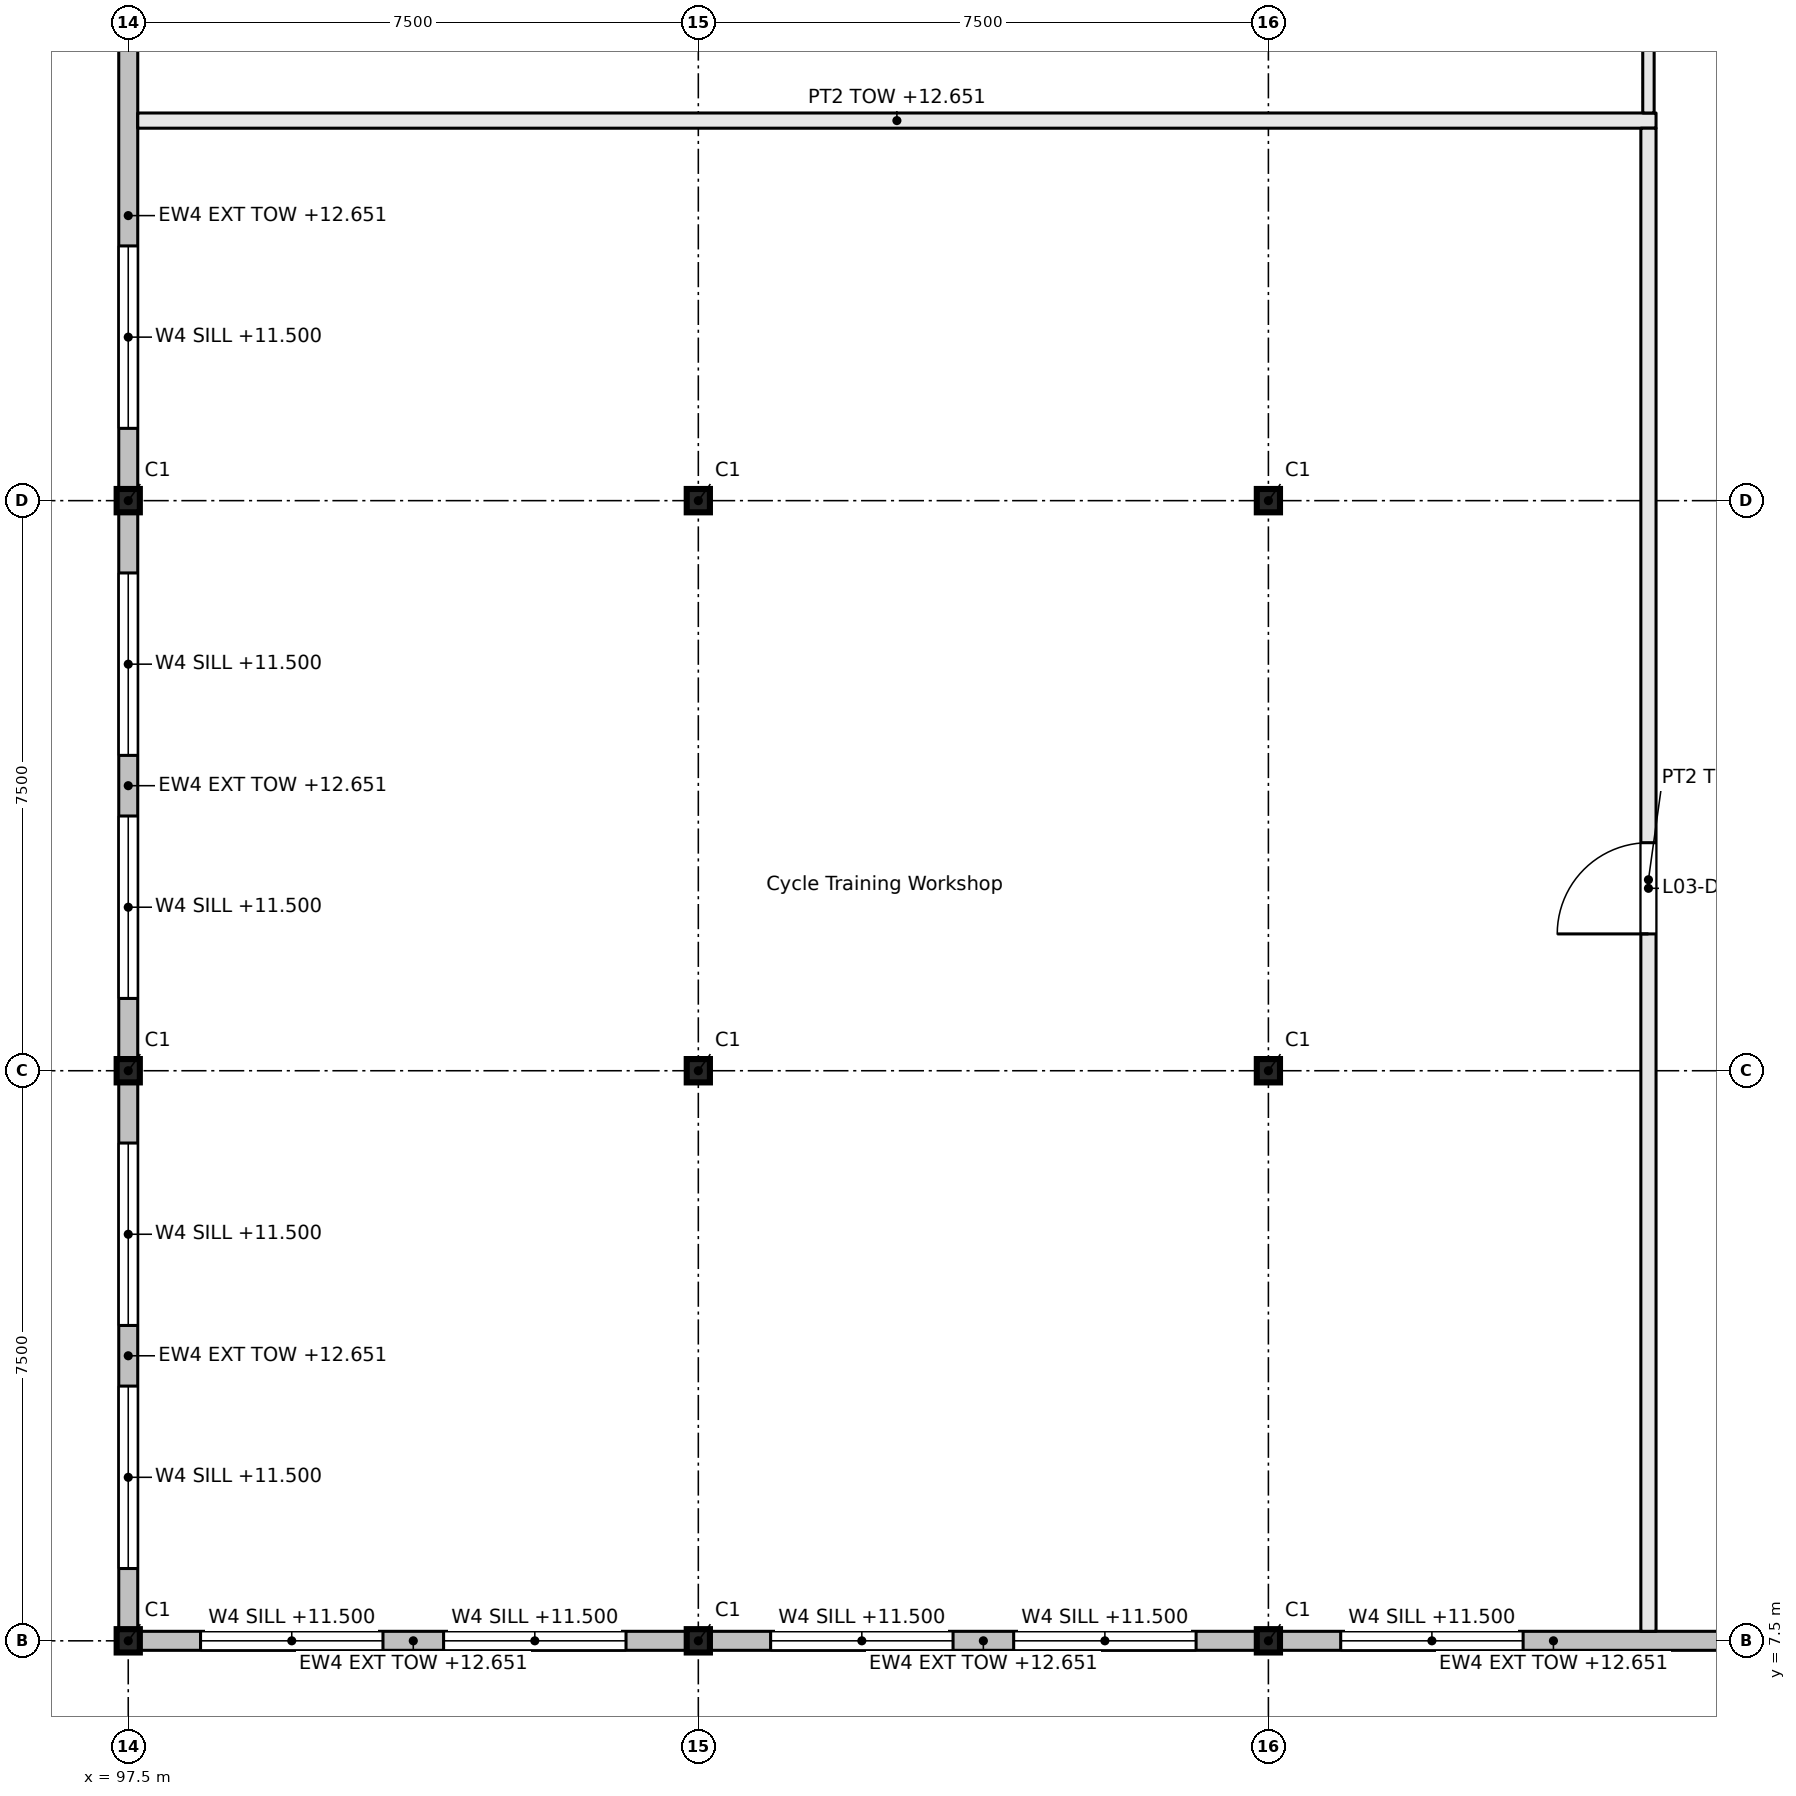
"""IFC4 building model, lengths in metres.
Left out: names, types, materials, properties, quantities, classifications, styles, units other than length and angle.
Written with IfcOpenShell. Run it as: python <this file> out.ifc"""

import sys

from ifc_helpers import new_model, si_unit, direction, frame, frame_2d, origin, origin_2d, place, context, subcontext, project, spatial, rectangle, i_section, extrude, element, fill, save


model = new_model("IFC4")
c1 = context("Model", 3, precision=1e-05, world=origin(), true_north=direction((0.0, 1.0)))
c2 = subcontext(c1, "Body", "Model", "MODEL_VIEW")
j1 = project(units=[si_unit("LENGTHUNIT", "METRE"), si_unit("PLANEANGLEUNIT", "RADIAN")], contexts=[c1])
p1 = place(None, origin())
s1 = spatial("IfcSite", under=j1, at=p1, CompositionType="ELEMENT")
p2 = place(p1, origin())
s2 = spatial("IfcBuilding", under=s1, at=p2, CompositionType="ELEMENT")
p3 = place(p2, frame((0.0, 0.0, 9.9)))
s3 = spatial("IfcBuildingStorey", under=s2, at=p3, CompositionType="ELEMENT", Elevation=9.9)
for number, where, z_axis, x_axis in (
    (1, (97.5, 7.5, 0.0), (0.0, 0.0, 1.0), (1.0, 0.0, 0.0)),
    (2, (97.5, 15.0, 0.0), (0.0, 0.0, 1.0), (1.0, 0.0, 0.0)),
    (3, (97.5, 22.5, 0.0), (0.0, 0.0, 1.0), (1.0, 0.0, 0.0)),
    (4, (105.0, 7.5, 0.0), (0.0, 0.0, 1.0), (1.0, 0.0, 0.0)),
    (5, (105.0, 15.0, 0.0), (0.0, 0.0, 1.0), (1.0, 0.0, 0.0)),
    (6, (105.0, 22.5, 0.0), (0.0, 0.0, 1.0), (1.0, 0.0, 0.0)),
    (7, (112.5, 7.5, 0.0), (0.0, 0.0, 1.0), (1.0, 0.0, 0.0)),
    (8, (112.5, 15.0, 0.0), (0.0, 0.0, 1.0), (1.0, 0.0, 0.0)),
    (9, (112.5, 22.5, 0.0), (0.0, 0.0, 1.0), (1.0, 0.0, 0.0)),
):
    element("IfcColumn", number, at=place(p3, frame(where, z_axis=z_axis, x_axis=x_axis)), inside=s3, PredefinedType="COLUMN", context=c2, shape_type="SweptSolid", body=[
        extrude(i_section(OverallWidth=0.305, OverallDepth=0.307, WebThickness=0.01, FlangeThickness=0.015, FilletRadius=0.015, at=origin_2d()), origin(), (0.0, 0.0, 1.0), 3.3),
    ])
p4 = place(p3, frame((97.625, 27.5, 0.0), z_axis=(0.0, 0.0, 1.0), x_axis=(1.0, 0.0, 0.0)))
e10 = element("IfcWall", 10, at=p4, inside=s3, PredefinedType="PARTITIONING", context=c2, shape_type="SweptSolid", body=[
    extrude(rectangle(XDim=19.975, YDim=0.2, at=frame_2d((9.988, 0.0))), origin(), (0.0, 0.0, 1.0), 2.751),
])
p5 = place(p3, frame((117.5, 7.625, 0.0), z_axis=(0.0, 0.0, 1.0), x_axis=(0.0, 1.0, 0.0)))
e11 = element("IfcWall", 11, at=p5, inside=s3, PredefinedType="PARTITIONING", context=c2, shape_type="SweptSolid", body=[
    extrude(rectangle(XDim=19.775, YDim=0.2, at=frame_2d((9.887, 0.0))), origin(), (0.0, 0.0, 1.0), 2.627),
])
p6 = place(p5, frame((9.175, 0.0, 0.0)))
e12 = element("IfcOpeningElement", 12, at=p6, cuts=e11, PredefinedType="OPENING", context=c2, shape_type="SweptSolid", body=[
    extrude(rectangle(XDim=1.2, YDim=2.1, at=frame_2d((0.6, 1.05))), frame((0.0, 0.11, 0.0), z_axis=(0.0, -1.0, 0.0), x_axis=(1.0, 0.0, 0.0)), (0.0, 0.0, 1.0), 0.22),
])
p7 = place(p3, frame((117.5, 27.6, 0.0), z_axis=(0.0, 0.0, 1.0), x_axis=(0.0, 1.0, 0.0)))
e13 = element("IfcWall", 13, at=p7, inside=s3, PredefinedType="PARTITIONING", context=c2, shape_type="SweptSolid", body=[
    extrude(rectangle(XDim=14.325, YDim=0.15, at=frame_2d((7.163, 0.0))), origin(), (0.0, 0.0, 1.0), 2.627),
])
p8 = place(p7, frame((6.55, 0.0, 0.0)))
e14 = element("IfcOpeningElement", 14, at=p8, cuts=e13, PredefinedType="OPENING", context=c2, shape_type="SweptSolid", body=[
    extrude(rectangle(XDim=1.2, YDim=2.1, at=frame_2d((0.6, 1.05))), frame((0.0, 0.085, 0.0), z_axis=(0.0, -1.0, 0.0), x_axis=(1.0, 0.0, 0.0)), (0.0, 0.0, 1.0), 0.17),
])
p9 = place(p3, frame((97.654, 7.5, 0.0), z_axis=(0.0, 0.0, 1.0), x_axis=(1.0, 0.0, 0.0)))
e15 = element("IfcWall", 15, at=p9, inside=s3, PredefinedType="SOLIDWALL", context=c2, shape_type="SweptSolid", body=[
    extrude(rectangle(XDim=7.193, YDim=0.25, at=frame_2d((3.596, 0.0))), origin(), (0.0, 0.0, 1.0), 2.751),
])
p10 = place(p9, frame((0.798, 0.0, 1.6)))
e16 = element("IfcOpeningElement", 16, at=p10, cuts=e15, PredefinedType="OPENING", context=c2, shape_type="SweptSolid", body=[
    extrude(rectangle(XDim=2.4, YDim=0.9, at=frame_2d((1.2, 0.45))), frame((0.0, 0.135, 0.0), z_axis=(0.0, -1.0, 0.0), x_axis=(1.0, 0.0, 0.0)), (0.0, 0.0, 1.0), 0.27),
])
p11 = place(p9, frame((3.995, 0.0, 1.6)))
e17 = element("IfcOpeningElement", 17, at=p11, cuts=e15, PredefinedType="OPENING", context=c2, shape_type="SweptSolid", body=[
    extrude(rectangle(XDim=2.4, YDim=0.9, at=frame_2d((1.2, 0.45))), frame((0.0, 0.135, 0.0), z_axis=(0.0, -1.0, 0.0), x_axis=(1.0, 0.0, 0.0)), (0.0, 0.0, 1.0), 0.27),
])
p12 = place(p3, frame((105.154, 7.5, 0.0), z_axis=(0.0, 0.0, 1.0), x_axis=(1.0, 0.0, 0.0)))
e18 = element("IfcWall", 18, at=p12, inside=s3, PredefinedType="SOLIDWALL", context=c2, shape_type="SweptSolid", body=[
    extrude(rectangle(XDim=7.193, YDim=0.25, at=frame_2d((3.596, 0.0))), origin(), (0.0, 0.0, 1.0), 2.751),
])
p13 = place(p12, frame((0.798, 0.0, 1.6)))
e19 = element("IfcOpeningElement", 19, at=p13, cuts=e18, PredefinedType="OPENING", context=c2, shape_type="SweptSolid", body=[
    extrude(rectangle(XDim=2.4, YDim=0.9, at=frame_2d((1.2, 0.45))), frame((0.0, 0.135, 0.0), z_axis=(0.0, -1.0, 0.0), x_axis=(1.0, 0.0, 0.0)), (0.0, 0.0, 1.0), 0.27),
])
p14 = place(p12, frame((3.995, 0.0, 1.6)))
e20 = element("IfcOpeningElement", 20, at=p14, cuts=e18, PredefinedType="OPENING", context=c2, shape_type="SweptSolid", body=[
    extrude(rectangle(XDim=2.4, YDim=0.9, at=frame_2d((1.2, 0.45))), frame((0.0, 0.135, 0.0), z_axis=(0.0, -1.0, 0.0), x_axis=(1.0, 0.0, 0.0)), (0.0, 0.0, 1.0), 0.27),
])
p15 = place(p3, frame((112.654, 7.5, 0.0), z_axis=(0.0, 0.0, 1.0), x_axis=(1.0, 0.0, 0.0)))
e21 = element("IfcWall", 21, at=p15, inside=s3, PredefinedType="SOLIDWALL", context=c2, shape_type="SweptSolid", body=[
    extrude(rectangle(XDim=7.193, YDim=0.25, at=frame_2d((3.596, 0.0))), origin(), (0.0, 0.0, 1.0), 2.751),
])
p16 = place(p15, frame((0.798, 0.0, 1.6)))
e22 = element("IfcOpeningElement", 22, at=p16, cuts=e21, PredefinedType="OPENING", context=c2, shape_type="SweptSolid", body=[
    extrude(rectangle(XDim=2.4, YDim=0.9, at=frame_2d((1.2, 0.45))), frame((0.0, 0.135, 0.0), z_axis=(0.0, -1.0, 0.0), x_axis=(1.0, 0.0, 0.0)), (0.0, 0.0, 1.0), 0.27),
])
p17 = place(p3, frame((97.5, 7.654, 0.0), z_axis=(0.0, 0.0, 1.0), x_axis=(0.0, 1.0, 0.0)))
e23 = element("IfcWall", 23, at=p17, inside=s3, PredefinedType="SOLIDWALL", context=c2, shape_type="SweptSolid", body=[
    extrude(rectangle(XDim=7.193, YDim=0.25, at=frame_2d((3.596, 0.0))), origin(), (0.0, 0.0, 1.0), 2.751),
])
p18 = place(p17, frame((0.798, 0.0, 1.6)))
e24 = element("IfcOpeningElement", 24, at=p18, cuts=e23, PredefinedType="OPENING", context=c2, shape_type="SweptSolid", body=[
    extrude(rectangle(XDim=2.4, YDim=0.9, at=frame_2d((1.2, 0.45))), frame((0.0, 0.135, 0.0), z_axis=(0.0, -1.0, 0.0), x_axis=(1.0, 0.0, 0.0)), (0.0, 0.0, 1.0), 0.27),
])
p19 = place(p17, frame((3.995, 0.0, 1.6)))
e25 = element("IfcOpeningElement", 25, at=p19, cuts=e23, PredefinedType="OPENING", context=c2, shape_type="SweptSolid", body=[
    extrude(rectangle(XDim=2.4, YDim=0.9, at=frame_2d((1.2, 0.45))), frame((0.0, 0.135, 0.0), z_axis=(0.0, -1.0, 0.0), x_axis=(1.0, 0.0, 0.0)), (0.0, 0.0, 1.0), 0.27),
])
p20 = place(p3, frame((97.5, 15.154, 0.0), z_axis=(0.0, 0.0, 1.0), x_axis=(0.0, 1.0, 0.0)))
e26 = element("IfcWall", 26, at=p20, inside=s3, PredefinedType="SOLIDWALL", context=c2, shape_type="SweptSolid", body=[
    extrude(rectangle(XDim=7.193, YDim=0.25, at=frame_2d((3.596, 0.0))), origin(), (0.0, 0.0, 1.0), 2.751),
])
p21 = place(p20, frame((0.798, 0.0, 1.6)))
e27 = element("IfcOpeningElement", 27, at=p21, cuts=e26, PredefinedType="OPENING", context=c2, shape_type="SweptSolid", body=[
    extrude(rectangle(XDim=2.4, YDim=0.9, at=frame_2d((1.2, 0.45))), frame((0.0, 0.135, 0.0), z_axis=(0.0, -1.0, 0.0), x_axis=(1.0, 0.0, 0.0)), (0.0, 0.0, 1.0), 0.27),
])
p22 = place(p20, frame((3.995, 0.0, 1.6)))
e28 = element("IfcOpeningElement", 28, at=p22, cuts=e26, PredefinedType="OPENING", context=c2, shape_type="SweptSolid", body=[
    extrude(rectangle(XDim=2.4, YDim=0.9, at=frame_2d((1.2, 0.45))), frame((0.0, 0.135, 0.0), z_axis=(0.0, -1.0, 0.0), x_axis=(1.0, 0.0, 0.0)), (0.0, 0.0, 1.0), 0.27),
])
p23 = place(p3, frame((97.5, 22.654, 0.0), z_axis=(0.0, 0.0, 1.0), x_axis=(0.0, 1.0, 0.0)))
e29 = element("IfcWall", 29, at=p23, inside=s3, PredefinedType="SOLIDWALL", context=c2, shape_type="SweptSolid", body=[
    extrude(rectangle(XDim=7.193, YDim=0.25, at=frame_2d((3.596, 0.0))), origin(), (0.0, 0.0, 1.0), 2.751),
])
p24 = place(p23, frame((0.798, 0.0, 1.6)))
e30 = element("IfcOpeningElement", 30, at=p24, cuts=e29, PredefinedType="OPENING", context=c2, shape_type="SweptSolid", body=[
    extrude(rectangle(XDim=2.4, YDim=0.9, at=frame_2d((1.2, 0.45))), frame((0.0, 0.135, 0.0), z_axis=(0.0, -1.0, 0.0), x_axis=(1.0, 0.0, 0.0)), (0.0, 0.0, 1.0), 0.27),
])
p25 = place(p6, origin())
e31 = element("IfcDoor", 31, at=p25, inside=s3, OperationType="DOUBLE_DOOR_SINGLE_SWING", PredefinedType="DOOR", context=c2, shape_type="SweptSolid", body=[
    extrude(rectangle(XDim=1.2, YDim=2.1, at=frame_2d((0.6, 1.05))), frame((0.0, 0.025, 0.0), z_axis=(0.0, -1.0, 0.0), x_axis=(1.0, 0.0, 0.0)), (0.0, 0.0, 1.0), 0.05),
])
fill(e12, e31)
p26 = place(p10, origin())
e32 = element("IfcWindow", 32, at=p26, inside=s3, PartitioningType="DOUBLE_PANEL_VERTICAL", PredefinedType="WINDOW", context=c2, shape_type="SweptSolid", body=[
    extrude(rectangle(XDim=2.4, YDim=0.9, at=frame_2d((1.2, 0.45))), frame((0.0, 0.03, 0.0), z_axis=(0.0, -1.0, 0.0), x_axis=(1.0, 0.0, 0.0)), (0.0, 0.0, 1.0), 0.06),
])
fill(e16, e32)
p27 = place(p11, origin())
e33 = element("IfcWindow", 33, at=p27, inside=s3, PartitioningType="DOUBLE_PANEL_VERTICAL", PredefinedType="WINDOW", context=c2, shape_type="SweptSolid", body=[
    extrude(rectangle(XDim=2.4, YDim=0.9, at=frame_2d((1.2, 0.45))), frame((0.0, 0.03, 0.0), z_axis=(0.0, -1.0, 0.0), x_axis=(1.0, 0.0, 0.0)), (0.0, 0.0, 1.0), 0.06),
])
fill(e17, e33)
p28 = place(p13, origin())
e34 = element("IfcWindow", 34, at=p28, inside=s3, PartitioningType="DOUBLE_PANEL_VERTICAL", PredefinedType="WINDOW", context=c2, shape_type="SweptSolid", body=[
    extrude(rectangle(XDim=2.4, YDim=0.9, at=frame_2d((1.2, 0.45))), frame((0.0, 0.03, 0.0), z_axis=(0.0, -1.0, 0.0), x_axis=(1.0, 0.0, 0.0)), (0.0, 0.0, 1.0), 0.06),
])
fill(e19, e34)
p29 = place(p14, origin())
e35 = element("IfcWindow", 35, at=p29, inside=s3, PartitioningType="DOUBLE_PANEL_VERTICAL", PredefinedType="WINDOW", context=c2, shape_type="SweptSolid", body=[
    extrude(rectangle(XDim=2.4, YDim=0.9, at=frame_2d((1.2, 0.45))), frame((0.0, 0.03, 0.0), z_axis=(0.0, -1.0, 0.0), x_axis=(1.0, 0.0, 0.0)), (0.0, 0.0, 1.0), 0.06),
])
fill(e20, e35)
p30 = place(p16, origin())
e36 = element("IfcWindow", 36, at=p30, inside=s3, PartitioningType="DOUBLE_PANEL_VERTICAL", PredefinedType="WINDOW", context=c2, shape_type="SweptSolid", body=[
    extrude(rectangle(XDim=2.4, YDim=0.9, at=frame_2d((1.2, 0.45))), frame((0.0, 0.03, 0.0), z_axis=(0.0, -1.0, 0.0), x_axis=(1.0, 0.0, 0.0)), (0.0, 0.0, 1.0), 0.06),
])
fill(e22, e36)
p31 = place(p18, origin())
e37 = element("IfcWindow", 37, at=p31, inside=s3, PartitioningType="DOUBLE_PANEL_VERTICAL", PredefinedType="WINDOW", context=c2, shape_type="SweptSolid", body=[
    extrude(rectangle(XDim=2.4, YDim=0.9, at=frame_2d((1.2, 0.45))), frame((0.0, 0.03, 0.0), z_axis=(0.0, -1.0, 0.0), x_axis=(1.0, 0.0, 0.0)), (0.0, 0.0, 1.0), 0.06),
])
fill(e24, e37)
p32 = place(p19, origin())
e38 = element("IfcWindow", 38, at=p32, inside=s3, PartitioningType="DOUBLE_PANEL_VERTICAL", PredefinedType="WINDOW", context=c2, shape_type="SweptSolid", body=[
    extrude(rectangle(XDim=2.4, YDim=0.9, at=frame_2d((1.2, 0.45))), frame((0.0, 0.03, 0.0), z_axis=(0.0, -1.0, 0.0), x_axis=(1.0, 0.0, 0.0)), (0.0, 0.0, 1.0), 0.06),
])
fill(e25, e38)
p33 = place(p21, origin())
e39 = element("IfcWindow", 39, at=p33, inside=s3, PartitioningType="DOUBLE_PANEL_VERTICAL", PredefinedType="WINDOW", context=c2, shape_type="SweptSolid", body=[
    extrude(rectangle(XDim=2.4, YDim=0.9, at=frame_2d((1.2, 0.45))), frame((0.0, 0.03, 0.0), z_axis=(0.0, -1.0, 0.0), x_axis=(1.0, 0.0, 0.0)), (0.0, 0.0, 1.0), 0.06),
])
fill(e27, e39)
p34 = place(p22, origin())
e40 = element("IfcWindow", 40, at=p34, inside=s3, PartitioningType="DOUBLE_PANEL_VERTICAL", PredefinedType="WINDOW", context=c2, shape_type="SweptSolid", body=[
    extrude(rectangle(XDim=2.4, YDim=0.9, at=frame_2d((1.2, 0.45))), frame((0.0, 0.03, 0.0), z_axis=(0.0, -1.0, 0.0), x_axis=(1.0, 0.0, 0.0)), (0.0, 0.0, 1.0), 0.06),
])
fill(e28, e40)
p35 = place(p24, origin())
e41 = element("IfcWindow", 41, at=p35, inside=s3, PartitioningType="DOUBLE_PANEL_VERTICAL", PredefinedType="WINDOW", context=c2, shape_type="SweptSolid", body=[
    extrude(rectangle(XDim=2.4, YDim=0.9, at=frame_2d((1.2, 0.45))), frame((0.0, 0.03, 0.0), z_axis=(0.0, -1.0, 0.0), x_axis=(1.0, 0.0, 0.0)), (0.0, 0.0, 1.0), 0.06),
])
fill(e30, e41)
save(model, sys.argv[1])
